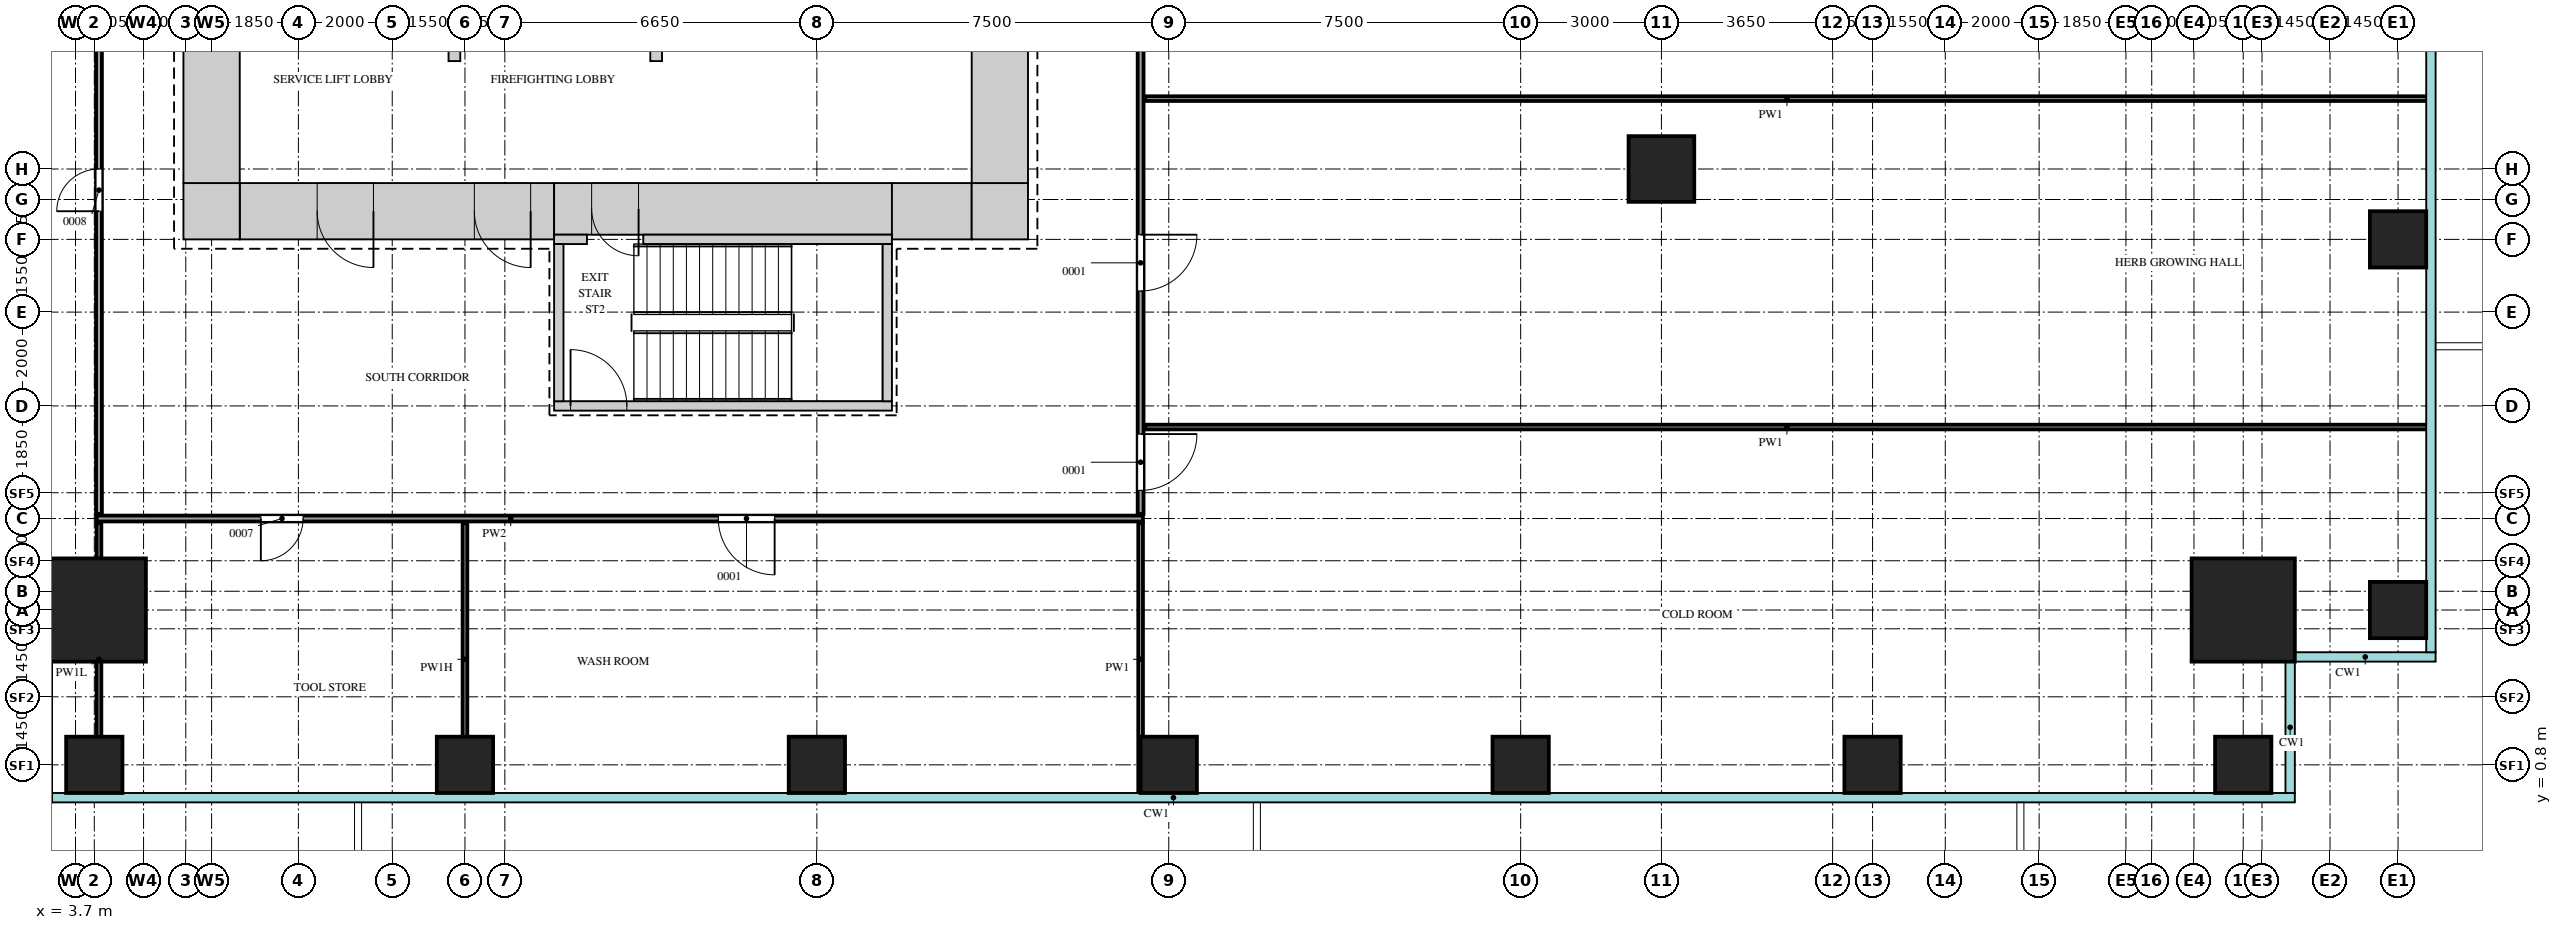
"""IFC4 building model, lengths in metres.
Left out: names, types, materials, properties, quantities, classifications, styles, units other than length and angle.
Written with IfcOpenShell. Run it as: python <this file> out.ifc"""

import sys

from ifc_helpers import new_model, si_unit, direction, frame, frame_2d, origin, origin_2d, place, context, subcontext, project, spatial, rectangle, extrude, source, transform, mapped, element, fill, save


model = new_model("IFC4")
c1 = context("Model", 3, precision=1e-05, world=origin(), true_north=direction((0.0, 1.0)))
c2 = subcontext(c1, "Body", "Model", "MODEL_VIEW")
j1 = project(units=[si_unit("LENGTHUNIT", "METRE"), si_unit("PLANEANGLEUNIT", "RADIAN")], contexts=[c1])
p1 = place(None, origin())
s1 = spatial("IfcSite", under=j1, at=p1, CompositionType="ELEMENT")
p2 = place(p1, origin())
s2 = spatial("IfcBuilding", under=s1, at=p2, CompositionType="ELEMENT")
p3 = place(p2, frame((0.0, 0.0, 69.0)))
s3 = spatial("IfcBuildingStorey", under=s2, at=p3, CompositionType="ELEMENT", Elevation=69.0)
m1 = source(origin(), c2, "Body", "SweptSolid", [
    extrude(rectangle(XDim=6.7, YDim=1.2, at=frame_2d((3.35, 0.0))), origin(), (0.0, 0.0, 1.0), 4.2),
])
p4 = place(p3, frame((7.2, 12.6, 0.0), z_axis=(0.0, 0.0, 1.0), x_axis=(1.0, 0.0, 0.0)))
e1 = element("IfcWall", 1, at=p4, inside=s3, PredefinedType="SHEAR", context=c2, shape_type="MappedRepresentation", body=[
    mapped(m1, transform((0.0, 0.0, 0.0))),
])
m2 = source(origin(), c2, "Body", "SweptSolid", [
    extrude(rectangle(XDim=1.2, YDim=2.1, at=frame_2d((0.6, 1.05))), frame((0.0, 0.61, 0.0), z_axis=(0.0, -1.0, 0.0), x_axis=(1.0, 0.0, 0.0)), (0.0, 0.0, 1.0), 1.22),
])
p5 = place(p4, frame((5.0, 0.0, 0.0)))
e2 = element("IfcOpeningElement", 2, at=p5, cuts=e1, PredefinedType="OPENING", context=c2, shape_type="MappedRepresentation", body=[
    mapped(m2, transform((0.0, 0.0, 0.0))),
])
p6 = place(p4, frame((1.65, 0.0, 0.0)))
e3 = element("IfcOpeningElement", 3, at=p6, cuts=e1, PredefinedType="OPENING", context=c2, shape_type="MappedRepresentation", body=[
    mapped(m2, transform((0.0, 0.0, 0.0))),
])
m3 = source(origin(), c2, "Body", "SweptSolid", [
    extrude(rectangle(XDim=7.2, YDim=1.1, at=frame_2d((3.6, 0.0))), origin(), (0.0, 0.0, 1.0), 4.2),
])
p7 = place(p3, frame((13.9, 12.65, 0.0), z_axis=(0.0, 0.0, 1.0), x_axis=(1.0, 0.0, 0.0)))
e4 = element("IfcWall", 4, at=p7, inside=s3, PredefinedType="SHEAR", context=c2, shape_type="MappedRepresentation", body=[
    mapped(m3, transform((0.0, 0.0, 0.0))),
])
m4 = source(origin(), c2, "Body", "SweptSolid", [
    extrude(rectangle(XDim=1.0, YDim=2.1, at=frame_2d((0.5, 1.05))), frame((0.0, 0.56, 0.0), z_axis=(0.0, -1.0, 0.0), x_axis=(1.0, 0.0, 0.0)), (0.0, 0.0, 1.0), 1.12),
])
p8 = place(p7, frame((0.8, 0.0, 0.0)))
e5 = element("IfcOpeningElement", 5, at=p8, cuts=e4, PredefinedType="OPENING", context=c2, shape_type="MappedRepresentation", body=[
    mapped(m4, transform((0.0, 0.0, 0.0))),
])
m5 = source(origin(), c2, "Body", "SweptSolid", [
    extrude(rectangle(XDim=1.7, YDim=1.2, at=frame_2d((0.85, 0.0))), origin(), (0.0, 0.0, 1.0), 4.2),
])
p9 = place(p3, frame((21.1, 12.6, 0.0), z_axis=(0.0, 0.0, 1.0), x_axis=(1.0, 0.0, 0.0)))
e6 = element("IfcWall", 6, at=p9, inside=s3, PredefinedType="SHEAR", context=c2, shape_type="MappedRepresentation", body=[
    mapped(m5, transform((0.0, 0.0, 0.0))),
])
m6 = source(origin(), c2, "Body", "SweptSolid", [
    extrude(rectangle(XDim=1.2, YDim=1.2, at=frame_2d((0.6, 0.0))), origin(), (0.0, 0.0, 1.0), 4.2),
])
for number, where, z_axis, x_axis in (
    (7, (22.8, 12.6, 0.0), (0.0, 0.0, 1.0), (1.0, 0.0, 0.0)),
    (8, (6.0, 12.6, 0.0), (0.0, 0.0, 1.0), (1.0, 0.0, 0.0)),
):
    element("IfcWall", number, at=place(p3, frame(where, z_axis=z_axis, x_axis=x_axis)), inside=s3, PredefinedType="SHEAR", context=c2, shape_type="MappedRepresentation", body=[
        mapped(m6, transform((0.0, 0.0, 0.0))),
    ])
m7 = source(origin(), c2, "Body", "SweptSolid", [
    extrude(rectangle(XDim=27.6, YDim=1.2, at=frame_2d((13.8, 0.0))), origin(), (0.0, 0.0, 1.0), 4.2),
])
p10 = place(p3, frame((23.4, 13.2, 0.0), z_axis=(0.0, 0.0, 1.0), x_axis=(0.0, 1.0, 0.0)))
e9 = element("IfcWall", 9, at=p10, inside=s3, PredefinedType="SHEAR", context=c2, shape_type="MappedRepresentation", body=[
    mapped(m7, transform((0.0, 0.0, 0.0))),
])
m8 = source(origin(), c2, "Body", "SweptSolid", [
    extrude(rectangle(XDim=1.8, YDim=2.1, at=frame_2d((0.9, 1.05))), frame((0.0, 0.61, 0.0), z_axis=(0.0, -1.0, 0.0), x_axis=(1.0, 0.0, 0.0)), (0.0, 0.0, 1.0), 1.22),
])
p11 = place(p10, frame((22.4, 0.0, 0.0)))
e10 = element("IfcOpeningElement", 10, at=p11, cuts=e9, PredefinedType="OPENING", context=c2, shape_type="MappedRepresentation", body=[
    mapped(m8, transform((0.0, 0.0, 0.0))),
])
p12 = place(p10, frame((12.15, 0.0, 0.0)))
e11 = element("IfcOpeningElement", 11, at=p12, cuts=e9, PredefinedType="OPENING", context=c2, shape_type="MappedRepresentation", body=[
    mapped(m2, transform((0.0, 0.0, 0.0))),
])
m9 = source(origin(), c2, "Body", "SweptSolid", [
    extrude(rectangle(XDim=0.9, YDim=2.1, at=frame_2d((0.45, 1.05))), frame((0.0, 0.61, 0.0), z_axis=(0.0, -1.0, 0.0), x_axis=(1.0, 0.0, 0.0)), (0.0, 0.0, 1.0), 1.22),
])
p13 = place(p10, frame((4.4, 0.0, 0.0)))
e12 = element("IfcOpeningElement", 12, at=p13, cuts=e9, PredefinedType="OPENING", context=c2, shape_type="MappedRepresentation", body=[
    mapped(m9, transform((0.0, 0.0, 0.0))),
])
p14 = place(p3, frame((6.6, 13.2, 0.0), z_axis=(0.0, 0.0, 1.0), x_axis=(0.0, 1.0, 0.0)))
e13 = element("IfcWall", 13, at=p14, inside=s3, PredefinedType="SHEAR", context=c2, shape_type="MappedRepresentation", body=[
    mapped(m7, transform((0.0, 0.0, 0.0))),
])
m10 = source(origin(), c2, "Body", "SweptSolid", [
    extrude(rectangle(XDim=0.7, YDim=0.2, at=frame_2d((0.35, 0.0))), origin(), (0.0, 0.0, 1.0), 4.2),
])
p15 = place(p3, frame((13.9, 12.0, 0.0), z_axis=(0.0, 0.0, 1.0), x_axis=(1.0, 0.0, 0.0)))
e14 = element("IfcWall", 14, at=p15, inside=s3, PredefinedType="SHEAR", context=c2, shape_type="MappedRepresentation", body=[
    mapped(m10, transform((0.0, 0.0, 0.0))),
])
m11 = source(origin(), c2, "Body", "SweptSolid", [
    extrude(rectangle(XDim=5.3, YDim=0.2, at=frame_2d((2.65, 0.0))), origin(), (0.0, 0.0, 1.0), 4.2),
])
p16 = place(p3, frame((15.8, 12.0, 0.0), z_axis=(0.0, 0.0, 1.0), x_axis=(1.0, 0.0, 0.0)))
e15 = element("IfcWall", 15, at=p16, inside=s3, PredefinedType="SHEAR", context=c2, shape_type="MappedRepresentation", body=[
    mapped(m11, transform((0.0, 0.0, 0.0))),
])
m12 = source(origin(), c2, "Body", "SweptSolid", [
    extrude(rectangle(XDim=7.2, YDim=0.2, at=frame_2d((3.6, 0.0))), origin(), (0.0, 0.0, 1.0), 4.2),
])
p17 = place(p3, frame((13.9, 8.45, 0.0), z_axis=(0.0, 0.0, 1.0), x_axis=(1.0, 0.0, 0.0)))
e16 = element("IfcWall", 16, at=p17, inside=s3, PredefinedType="SHEAR", context=c2, shape_type="MappedRepresentation", body=[
    mapped(m12, transform((0.0, 0.0, 0.0))),
])
m13 = source(origin(), c2, "Body", "SweptSolid", [
    extrude(rectangle(XDim=1.2, YDim=2.1, at=frame_2d((0.6, 1.05))), frame((0.0, 0.11, 0.0), z_axis=(0.0, -1.0, 0.0), x_axis=(1.0, 0.0, 0.0)), (0.0, 0.0, 1.0), 0.22),
])
p18 = place(p17, frame((0.35, 0.0, 0.0)))
e17 = element("IfcOpeningElement", 17, at=p18, cuts=e16, PredefinedType="OPENING", context=c2, shape_type="MappedRepresentation", body=[
    mapped(m13, transform((0.0, 0.0, 0.0))),
])
m14 = source(origin(), c2, "Body", "SweptSolid", [
    extrude(rectangle(XDim=3.35, YDim=0.2, at=frame_2d((1.675, 0.0))), origin(), (0.0, 0.0, 1.0), 4.2),
])
for number, where, z_axis, x_axis in (
    (18, (21.0, 8.55, 0.0), (0.0, 0.0, 1.0), (0.0, 1.0, 0.0)),
    (19, (14.0, 8.55, 0.0), (0.0, 0.0, 1.0), (0.0, 1.0, 0.0)),
):
    element("IfcWall", number, at=place(p3, frame(where, z_axis=z_axis, x_axis=x_axis)), inside=s3, PredefinedType="SHEAR", context=c2, shape_type="MappedRepresentation", body=[
        mapped(m14, transform((0.0, 0.0, 0.0))),
    ])
m15 = source(origin(), c2, "Body", "SweptSolid", [
    extrude(rectangle(XDim=3.4, YDim=0.25, at=frame_2d((1.7, 0.0))), origin(), (0.0, 0.0, 1.0), 4.2),
])
for number, where, z_axis, x_axis in (
    (20, (16.075, 15.8, 0.0), (0.0, 0.0, 1.0), (0.0, 1.0, 0.0)),
    (21, (11.775, 15.8, 0.0), (0.0, 0.0, 1.0), (0.0, 1.0, 0.0)),
):
    element("IfcWall", number, at=place(p3, frame(where, z_axis=z_axis, x_axis=x_axis)), inside=s3, PredefinedType="STANDARD", context=c2, shape_type="MappedRepresentation", body=[
        mapped(m15, transform((0.0, 0.0, 0.0))),
    ])
m16 = source(origin(), c2, "Body", "SweptSolid", [
    extrude(rectangle(XDim=2.2, YDim=2.2, at=origin_2d()), origin(), (0.0, 0.0, 1.0), 4.5),
])
for number, where, z_axis, x_axis in (
    (22, (49.9, 4.1, 0.0), (0.0, 0.0, 1.0), (1.0, 0.0, 0.0)),
    (23, (4.1, 4.1, 0.0), (0.0, 0.0, 1.0), (1.0, 0.0, 0.0)),
):
    element("IfcColumn", number, at=place(p3, frame(where, z_axis=z_axis, x_axis=x_axis)), inside=s3, PredefinedType="COLUMN", context=c2, shape_type="MappedRepresentation", body=[
        mapped(m16, transform((0.0, 0.0, 0.0))),
    ])
m17 = source(origin(), c2, "Body", "SweptSolid", [
    extrude(rectangle(XDim=1.2, YDim=1.2, at=origin_2d()), origin(), (0.0, 0.0, 1.0), 4.2),
])
for number, where, z_axis, x_axis in (
    (24, (4.1, 0.8, 0.0), (0.0, 0.0, 1.0), (1.0, 0.0, 0.0)),
    (25, (12.0, 0.8, 0.0), (0.0, 0.0, 1.0), (1.0, 0.0, 0.0)),
    (26, (19.5, 0.8, 0.0), (0.0, 0.0, 1.0), (1.0, 0.0, 0.0)),
    (27, (27.0, 0.8, 0.0), (0.0, 0.0, 1.0), (1.0, 0.0, 0.0)),
    (28, (34.5, 0.8, 0.0), (0.0, 0.0, 1.0), (1.0, 0.0, 0.0)),
    (29, (42.0, 0.8, 0.0), (0.0, 0.0, 1.0), (1.0, 0.0, 0.0)),
    (30, (49.9, 0.8, 0.0), (0.0, 0.0, 1.0), (1.0, 0.0, 0.0)),
    (31, (53.2, 4.1, 0.0), (0.0, 0.0, 1.0), (1.0, 0.0, 0.0)),
    (32, (53.2, 12.0, 0.0), (0.0, 0.0, 1.0), (1.0, 0.0, 0.0)),
):
    element("IfcColumn", number, at=place(p3, frame(where, z_axis=z_axis, x_axis=x_axis)), inside=s3, PredefinedType="COLUMN", context=c2, shape_type="MappedRepresentation", body=[
        mapped(m17, transform((0.0, 0.0, 0.0))),
    ])
m18 = source(origin(), c2, "Body", "SweptSolid", [
    extrude(rectangle(XDim=1.4, YDim=1.4, at=origin_2d()), origin(), (0.0, 0.0, 1.0), 4.2),
])
p19 = place(p3, frame((37.5, 13.5, 0.0), z_axis=(0.0, 0.0, 1.0), x_axis=(1.0, 0.0, 0.0)))
e33 = element("IfcColumn", 33, at=p19, inside=s3, PredefinedType="COLUMN", context=c2, shape_type="MappedRepresentation", body=[
    mapped(m18, transform((0.0, 0.0, 0.0))),
])
m19 = source(origin(), c2, "Body", "SweptSolid", [
    extrude(rectangle(XDim=5.8, YDim=0.1, at=frame_2d((2.9, 0.0))), origin(), (0.0, 0.0, 1.0), 3.6),
])
p20 = place(p3, frame((4.2, 0.15, 0.0), z_axis=(0.0, 0.0, 1.0), x_axis=(0.0, 1.0, 0.0)))
e34 = element("IfcWall", 34, at=p20, inside=s3, PredefinedType="PARTITIONING", context=c2, shape_type="MappedRepresentation", body=[
    mapped(m19, transform((0.0, 0.0, 0.0))),
])
m20 = source(origin(), c2, "Body", "SweptSolid", [
    extrude(rectangle(XDim=5.8, YDim=0.1, at=frame_2d((2.9, 0.0))), origin(), (0.0, 0.0, 1.0), 3.7),
])
p21 = place(p3, frame((12.0, 0.15, 0.0), z_axis=(0.0, 0.0, 1.0), x_axis=(0.0, 1.0, 0.0)))
e35 = element("IfcWall", 35, at=p21, inside=s3, PredefinedType="PARTITIONING", context=c2, shape_type="MappedRepresentation", body=[
    mapped(m20, transform((0.0, 0.0, 0.0))),
])
m21 = source(origin(), c2, "Body", "SweptSolid", [
    extrude(rectangle(XDim=5.8, YDim=0.1, at=frame_2d((2.9, 0.0))), origin(), (0.0, 0.0, 1.0), 4.3),
])
p22 = place(p3, frame((26.4, 0.15, 0.0), z_axis=(0.0, 0.0, 1.0), x_axis=(0.0, 1.0, 0.0)))
e36 = element("IfcWall", 36, at=p22, inside=s3, PredefinedType="PARTITIONING", context=c2, shape_type="MappedRepresentation", body=[
    mapped(m21, transform((0.0, 0.0, 0.0))),
])
m22 = source(origin(), c2, "Body", "SweptSolid", [
    extrude(rectangle(XDim=22.3, YDim=0.125, at=frame_2d((11.15, 0.0))), origin(), (0.0, 0.0, 1.0), 4.3),
])
p23 = place(p3, frame((4.15, 6.05, 0.0), z_axis=(0.0, 0.0, 1.0), x_axis=(1.0, 0.0, 0.0)))
e37 = element("IfcWall", 37, at=p23, inside=s3, PredefinedType="PARTITIONING", context=c2, shape_type="MappedRepresentation", body=[
    mapped(m22, transform((0.0, 0.0, 0.0))),
])
m23 = source(origin(), c2, "Body", "SweptSolid", [
    extrude(rectangle(XDim=0.9, YDim=2.1, at=frame_2d((0.45, 1.05))), frame((0.0, 0.073, 0.0), z_axis=(0.0, -1.0, 0.0), x_axis=(1.0, 0.0, 0.0)), (0.0, 0.0, 1.0), 0.145),
])
p24 = place(p23, frame((3.5, 0.0, 0.0)))
e38 = element("IfcOpeningElement", 38, at=p24, cuts=e37, PredefinedType="OPENING", context=c2, shape_type="MappedRepresentation", body=[
    mapped(m23, transform((0.0, 0.0, 0.0))),
])
m24 = source(origin(), c2, "Body", "SweptSolid", [
    extrude(rectangle(XDim=1.2, YDim=2.1, at=frame_2d((0.6, 1.05))), frame((0.0, 0.073, 0.0), z_axis=(0.0, -1.0, 0.0), x_axis=(1.0, 0.0, 0.0)), (0.0, 0.0, 1.0), 0.145),
])
p25 = place(p23, frame((13.25, 0.0, 0.0)))
e39 = element("IfcOpeningElement", 39, at=p25, cuts=e37, PredefinedType="OPENING", context=c2, shape_type="MappedRepresentation", body=[
    mapped(m24, transform((0.0, 0.0, 0.0))),
])
m25 = source(origin(), c2, "Body", "SweptSolid", [
    extrude(rectangle(XDim=41.8, YDim=0.125, at=frame_2d((20.9, 0.0))), origin(), (0.0, 0.0, 1.0), 4.3),
])
p26 = place(p3, frame((4.2, 6.15, 0.0), z_axis=(0.0, 0.0, 1.0), x_axis=(0.0, 1.0, 0.0)))
e40 = element("IfcWall", 40, at=p26, inside=s3, PredefinedType="PARTITIONING", context=c2, shape_type="MappedRepresentation", body=[
    mapped(m25, transform((0.0, 0.0, 0.0))),
])
p27 = place(p26, frame((6.45, 0.0, 0.0)))
e41 = element("IfcOpeningElement", 41, at=p27, cuts=e40, PredefinedType="OPENING", context=c2, shape_type="MappedRepresentation", body=[
    mapped(m23, transform((0.0, 0.0, 0.0))),
])
p28 = place(p26, frame((25.05, 0.0, 0.0)))
e42 = element("IfcOpeningElement", 42, at=p28, cuts=e40, PredefinedType="OPENING", context=c2, shape_type="MappedRepresentation", body=[
    mapped(m24, transform((0.0, 0.0, 0.0))),
])
m26 = source(origin(), c2, "Body", "SweptSolid", [
    extrude(rectangle(XDim=29.05, YDim=0.125, at=frame_2d((14.525, 0.0))), origin(), (0.0, 0.0, 1.0), 4.3),
])
p29 = place(p3, frame((26.4, 6.15, 0.0), z_axis=(0.0, 0.0, 1.0), x_axis=(0.0, 1.0, 0.0)))
e43 = element("IfcWall", 43, at=p29, inside=s3, PredefinedType="PARTITIONING", context=c2, shape_type="MappedRepresentation", body=[
    mapped(m26, transform((0.0, 0.0, 0.0))),
])
p30 = place(p29, frame((0.5, 0.0, 0.0)))
e44 = element("IfcOpeningElement", 44, at=p30, cuts=e43, PredefinedType="OPENING", context=c2, shape_type="MappedRepresentation", body=[
    mapped(m24, transform((0.0, 0.0, 0.0))),
])
p31 = place(p29, frame((4.75, 0.0, 0.0)))
e45 = element("IfcOpeningElement", 45, at=p31, cuts=e43, PredefinedType="OPENING", context=c2, shape_type="MappedRepresentation", body=[
    mapped(m24, transform((0.0, 0.0, 0.0))),
])
p32 = place(p29, frame((11.25, 0.0, 0.0)))
e46 = element("IfcOpeningElement", 46, at=p32, cuts=e43, PredefinedType="OPENING", context=c2, shape_type="MappedRepresentation", body=[
    mapped(m24, transform((0.0, 0.0, 0.0))),
])
p33 = place(p29, frame((17.5, 0.0, 0.0)))
e47 = element("IfcOpeningElement", 47, at=p33, cuts=e43, PredefinedType="OPENING", context=c2, shape_type="MappedRepresentation", body=[
    mapped(m24, transform((0.0, 0.0, 0.0))),
])
m27 = source(origin(), c2, "Body", "SweptSolid", [
    extrude(rectangle(XDim=27.35, YDim=0.1, at=frame_2d((13.675, 0.0))), origin(), (0.0, 0.0, 1.0), 4.3),
])
for number, where, z_axis, x_axis in (
    (48, (26.5, 8.0, 0.0), (0.0, 0.0, 1.0), (1.0, 0.0, 0.0)),
    (49, (26.5, 15.0, 0.0), (0.0, 0.0, 1.0), (1.0, 0.0, 0.0)),
):
    element("IfcWall", number, at=place(p3, frame(where, z_axis=z_axis, x_axis=x_axis)), inside=s3, PredefinedType="PARTITIONING", context=c2, shape_type="MappedRepresentation", body=[
        mapped(m27, transform((0.0, 0.0, 0.0))),
    ])
m28 = source(origin(), c2, "Body", "SweptSolid", [
    extrude(rectangle(XDim=1.2, YDim=2.1, at=frame_2d((0.6, 1.05))), frame((0.0, 0.55, 0.0), z_axis=(0.0, -1.0, 0.0), x_axis=(1.0, 0.0, 0.0)), (0.0, 0.0, 1.0), 1.1),
])
p34 = place(p5, origin())
e50 = element("IfcDoor", 50, at=p34, inside=s3, OperationType="SINGLE_SWING_RIGHT", PredefinedType="DOOR", context=c2, shape_type="MappedRepresentation", body=[
    mapped(m28, transform((0.0, 0.0, 0.0))),
])
fill(e2, e50)
p35 = place(p6, origin())
e51 = element("IfcDoor", 51, at=p35, inside=s3, OperationType="SINGLE_SWING_RIGHT", PredefinedType="DOOR", context=c2, shape_type="MappedRepresentation", body=[
    mapped(m28, transform((0.0, 0.0, 0.0))),
])
fill(e3, e51)
m29 = source(origin(), c2, "Body", "SweptSolid", [
    extrude(rectangle(XDim=1.0, YDim=2.1, at=frame_2d((0.5, 1.05))), frame((0.0, 0.5, 0.0), z_axis=(0.0, -1.0, 0.0), x_axis=(1.0, 0.0, 0.0)), (0.0, 0.0, 1.0), 1.0),
])
p36 = place(p8, origin())
e52 = element("IfcDoor", 52, at=p36, inside=s3, OperationType="SINGLE_SWING_RIGHT", PredefinedType="DOOR", context=c2, shape_type="MappedRepresentation", body=[
    mapped(m29, transform((0.0, 0.0, 0.0))),
])
fill(e5, e52)
m30 = source(origin(), c2, "Body", "SweptSolid", [
    extrude(rectangle(XDim=1.2, YDim=2.1, at=frame_2d((0.6, 1.05))), frame((0.0, 0.025, 0.0), z_axis=(0.0, -1.0, 0.0), x_axis=(1.0, 0.0, 0.0)), (0.0, 0.0, 1.0), 0.05),
])
p37 = place(p30, origin())
e53 = element("IfcDoor", 53, at=p37, inside=s3, OperationType="SINGLE_SWING_RIGHT", PredefinedType="DOOR", context=c2, shape_type="MappedRepresentation", body=[
    mapped(m30, transform((0.0, 0.0, 0.0))),
])
fill(e44, e53)
p38 = place(p31, origin())
e54 = element("IfcDoor", 54, at=p38, inside=s3, OperationType="SINGLE_SWING_RIGHT", PredefinedType="DOOR", context=c2, shape_type="MappedRepresentation", body=[
    mapped(m30, transform((0.0, 0.0, 0.0))),
])
fill(e45, e54)
m31 = source(origin(), c2, "Body", "SweptSolid", [
    extrude(rectangle(XDim=0.9, YDim=2.1, at=frame_2d((0.45, 1.05))), frame((0.0, 0.025, 0.0), z_axis=(0.0, -1.0, 0.0), x_axis=(1.0, 0.0, 0.0)), (0.0, 0.0, 1.0), 0.05),
])
p39 = place(p27, origin())
e55 = element("IfcDoor", 55, at=p39, inside=s3, OperationType="SINGLE_SWING_RIGHT", PredefinedType="DOOR", context=c2, shape_type="MappedRepresentation", body=[
    mapped(m31, transform((0.0, 0.0, 0.0))),
])
fill(e41, e55)
p40 = place(p24, origin())
e56 = element("IfcDoor", 56, at=p40, inside=s3, OperationType="SINGLE_SWING_LEFT", PredefinedType="DOOR", context=c2, shape_type="MappedRepresentation", body=[
    mapped(m31, transform((0.0, 0.0, 0.0))),
])
fill(e38, e56)
p41 = place(p25, origin())
e57 = element("IfcDoor", 57, at=p41, inside=s3, OperationType="SINGLE_SWING_RIGHT", PredefinedType="DOOR", context=c2, shape_type="MappedRepresentation", body=[
    mapped(m30, transform((0.0, 0.0, 0.0))),
])
fill(e39, e57)
p42 = place(p18, origin())
e58 = element("IfcDoor", 58, at=p42, inside=s3, OperationType="SINGLE_SWING_RIGHT", PredefinedType="DOOR", context=c2, shape_type="MappedRepresentation", body=[
    mapped(m30, transform((0.0, 0.0, 0.0))),
])
fill(e17, e58)
save(model, sys.argv[1])
